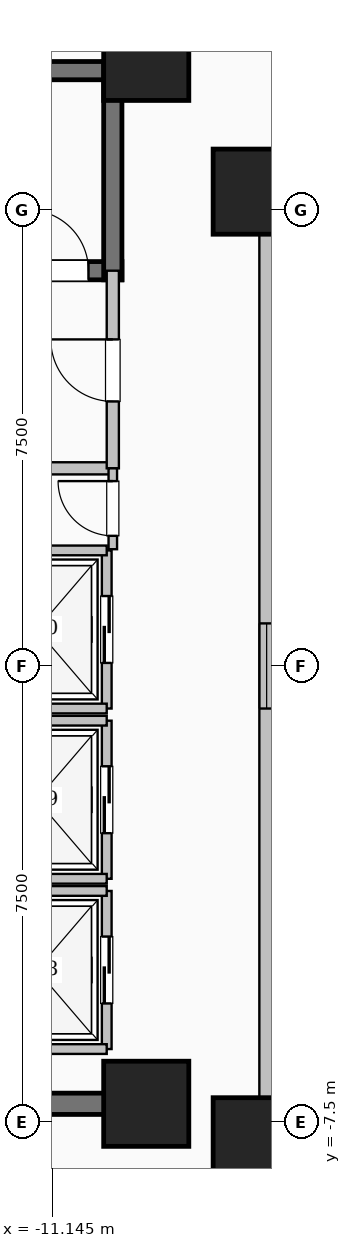
"""IFC4 building model, lengths in metres.
Left out: names, types, materials, properties, quantities, classifications, styles, units other than length and angle.
Written with IfcOpenShell. Run it as: python <this file> out.ifc"""

import sys

from ifc_helpers import new_model, si_unit, direction, frame, frame_2d, origin, origin_2d, place, context, subcontext, project, spatial, rectangle, extrude, element, fill, save


model = new_model("IFC4")
c1 = context("Model", 3, precision=1e-05, world=origin(), true_north=direction((0.0, 1.0)))
c2 = subcontext(c1, "Body", "Model", "MODEL_VIEW")
j1 = project(units=[si_unit("LENGTHUNIT", "METRE"), si_unit("PLANEANGLEUNIT", "RADIAN")], contexts=[c1])
p1 = place(None, origin())
s1 = spatial("IfcSite", under=j1, at=p1, CompositionType="ELEMENT")
p2 = place(p1, origin())
s2 = spatial("IfcBuilding", under=s1, at=p2, CompositionType="ELEMENT")
p3 = place(p2, frame((0.0, 0.0, 18.9)))
s3 = spatial("IfcBuildingStorey", under=s2, at=p3, CompositionType="ELEMENT", Elevation=18.9)
for number, where, z_axis, x_axis in (
    (1, (-7.8, -7.8, 0.0), (0.0, 0.0, 1.0), (1.0, 0.0, 0.0)),
    (2, (-7.8, 7.8, 0.0), (0.0, 0.0, 1.0), (1.0, 0.0, 0.0)),
    (3, (-9.6, -7.2, 0.0), (0.0, 0.0, 1.0), (1.0, 0.0, 0.0)),
    (4, (-9.6, 10.0, 0.0), (0.0, 0.0, 1.0), (1.0, 0.0, 0.0)),
):
    element("IfcColumn", number, at=place(p3, frame(where, z_axis=z_axis, x_axis=x_axis)), inside=s3, PredefinedType="COLUMN", context=c2, shape_type="SweptSolid", body=[
        extrude(rectangle(XDim=1.4, YDim=1.4, at=origin_2d()), origin(), (0.0, 0.0, 1.0), 5.1),
    ])
p4 = place(p3, frame((-7.62, -7.62, 0.0), z_axis=(0.0, 0.0, 1.0), x_axis=(1.0, 0.0, 0.0)))
e5 = element("IfcWall", 5, at=p4, inside=s3, PredefinedType="SOLIDWALL", context=c2, shape_type="SweptSolid", body=[
    extrude(rectangle(XDim=15.24, YDim=0.24, at=frame_2d((7.62, 0.0))), origin(), (0.0, 0.0, 1.0), 4.85),
])
p5 = place(p4, frame((6.92, 0.0, 0.95)))
e6 = element("IfcOpeningElement", 6, at=p5, cuts=e5, PredefinedType="OPENING", context=c2, shape_type="SweptSolid", body=[
    extrude(rectangle(XDim=1.4, YDim=1.5, at=frame_2d((0.7, 0.75))), frame((0.0, 0.13, 0.0), z_axis=(0.0, -1.0, 0.0), x_axis=(1.0, 0.0, 0.0)), (0.0, 0.0, 1.0), 0.26),
])
p6 = place(p3, frame((7.62, 7.62, 0.0), z_axis=(0.0, 0.0, 1.0), x_axis=(-1.0, 0.0, 0.0)))
e7 = element("IfcWall", 7, at=p6, inside=s3, PredefinedType="SOLIDWALL", context=c2, shape_type="SweptSolid", body=[
    extrude(rectangle(XDim=15.24, YDim=0.24, at=frame_2d((7.62, 0.0))), origin(), (0.0, 0.0, 1.0), 4.85),
])
p7 = place(p6, frame((6.92, 0.0, 0.95)))
e8 = element("IfcOpeningElement", 8, at=p7, cuts=e7, PredefinedType="OPENING", context=c2, shape_type="SweptSolid", body=[
    extrude(rectangle(XDim=1.4, YDim=1.5, at=frame_2d((0.7, 0.75))), frame((0.0, 0.13, 0.0), z_axis=(0.0, -1.0, 0.0), x_axis=(1.0, 0.0, 0.0)), (0.0, 0.0, 1.0), 0.26),
])
p8 = place(p3, frame((-7.62, 7.62, 0.0), z_axis=(0.0, 0.0, 1.0), x_axis=(0.0, -1.0, 0.0)))
e9 = element("IfcWall", 9, at=p8, inside=s3, PredefinedType="SOLIDWALL", context=c2, shape_type="SweptSolid", body=[
    extrude(rectangle(XDim=15.24, YDim=0.24, at=frame_2d((7.62, 0.0))), origin(), (0.0, 0.0, 1.0), 4.85),
])
p9 = place(p8, frame((6.92, 0.0, 0.95)))
e10 = element("IfcOpeningElement", 10, at=p9, cuts=e9, PredefinedType="OPENING", context=c2, shape_type="SweptSolid", body=[
    extrude(rectangle(XDim=1.4, YDim=1.5, at=frame_2d((0.7, 0.75))), frame((0.0, 0.13, 0.0), z_axis=(0.0, -1.0, 0.0), x_axis=(1.0, 0.0, 0.0)), (0.0, 0.0, 1.0), 0.26),
])
p10 = place(p3, frame((-18.0, 9.79, 0.0), z_axis=(0.0, 0.0, 1.0), x_axis=(1.0, 0.0, 0.0)))
e11 = element("IfcWall", 11, at=p10, inside=s3, PredefinedType="SHEAR", context=c2, shape_type="SweptSolid", body=[
    extrude(rectangle(XDim=8.0, YDim=0.3, at=frame_2d((4.0, 0.0))), origin(), (0.0, 0.0, 1.0), 5.1),
])
p11 = place(p3, frame((-18.0, 6.5, 0.0), z_axis=(0.0, 0.0, 1.0), x_axis=(1.0, 0.0, 0.0)))
e12 = element("IfcWall", 12, at=p11, inside=s3, PredefinedType="SHEAR", context=c2, shape_type="SweptSolid", body=[
    extrude(rectangle(XDim=8.0, YDim=0.3, at=frame_2d((4.0, 0.0))), origin(), (0.0, 0.0, 1.0), 5.1),
])
p12 = place(p11, frame((6.45, 0.0, 0.0)))
e13 = element("IfcOpeningElement", 13, at=p12, cuts=e12, PredefinedType="OPENING", context=c2, shape_type="SweptSolid", body=[
    extrude(rectangle(XDim=1.0, YDim=2.15, at=frame_2d((0.5, 1.075))), frame((0.0, 0.16, 0.0), z_axis=(0.0, -1.0, 0.0), x_axis=(1.0, 0.0, 0.0)), (0.0, 0.0, 1.0), 0.32),
])
p13 = place(p3, frame((-10.15, 6.35, 0.0), z_axis=(0.0, 0.0, 1.0), x_axis=(0.0, 1.0, 0.0)))
e14 = element("IfcWall", 14, at=p13, inside=s3, PredefinedType="SHEAR", context=c2, shape_type="SweptSolid", body=[
    extrude(rectangle(XDim=3.59, YDim=0.3, at=frame_2d((1.795, 0.0))), origin(), (0.0, 0.0, 1.0), 5.1),
])
p14 = place(p3, frame((-15.55, 3.25, 0.0), z_axis=(0.0, 0.0, 1.0), x_axis=(1.0, 0.0, 0.0)))
e15 = element("IfcWall", 15, at=p14, inside=s3, PredefinedType="SOLIDWALL", context=c2, shape_type="SweptSolid", body=[
    extrude(rectangle(XDim=5.4, YDim=0.2, at=frame_2d((2.7, 0.0))), origin(), (0.0, 0.0, 1.0), 4.85),
])
p15 = place(p3, frame((-10.15, 3.25, 0.0), z_axis=(0.0, 0.0, 1.0), x_axis=(0.0, 1.0, 0.0)))
e16 = element("IfcWall", 16, at=p15, inside=s3, PredefinedType="SOLIDWALL", context=c2, shape_type="SweptSolid", body=[
    extrude(rectangle(XDim=3.25, YDim=0.2, at=frame_2d((1.625, 0.0))), origin(), (0.0, 0.0, 1.0), 4.85),
])
p16 = place(p15, frame((1.1, 0.0, 0.0)))
e17 = element("IfcOpeningElement", 17, at=p16, cuts=e16, PredefinedType="OPENING", context=c2, shape_type="SweptSolid", body=[
    extrude(rectangle(XDim=1.02, YDim=2.15, at=frame_2d((0.51, 1.075))), frame((0.0, 0.11, 0.0), z_axis=(0.0, -1.0, 0.0), x_axis=(1.0, 0.0, 0.0)), (0.0, 0.0, 1.0), 0.22),
])
p17 = place(p3, frame((-10.25, -6.3, 0.0), z_axis=(0.0, 0.0, 1.0), x_axis=(0.0, 1.0, 0.0)))
e18 = element("IfcWall", 18, at=p17, inside=s3, PredefinedType="SOLIDWALL", context=c2, shape_type="SweptSolid", body=[
    extrude(rectangle(XDim=2.6, YDim=0.16, at=frame_2d((1.3, 0.0))), origin(), (0.0, 0.0, 1.0), 4.85),
])
p18 = place(p17, frame((0.75, 0.0, 0.0)))
e19 = element("IfcOpeningElement", 19, at=p18, cuts=e18, PredefinedType="OPENING", context=c2, shape_type="SweptSolid", body=[
    extrude(rectangle(XDim=1.1, YDim=2.15, at=frame_2d((0.55, 1.075))), frame((0.0, 0.09, 0.0), z_axis=(0.0, -1.0, 0.0), x_axis=(1.0, 0.0, 0.0)), (0.0, 0.0, 1.0), 0.18),
])
for number, where, z_axis, x_axis in (
    (20, (-12.55, -6.3, 0.0), (0.0, 0.0, 1.0), (1.0, 0.0, 0.0)),
    (21, (-12.55, -3.7, 0.0), (0.0, 0.0, 1.0), (1.0, 0.0, 0.0)),
):
    element("IfcWall", number, at=place(p3, frame(where, z_axis=z_axis, x_axis=x_axis)), inside=s3, PredefinedType="SOLIDWALL", context=c2, shape_type="SweptSolid", body=[
        extrude(rectangle(XDim=2.3, YDim=0.16, at=frame_2d((1.15, 0.0))), origin(), (0.0, 0.0, 1.0), 4.85),
    ])
p19 = place(p3, frame((-10.25, -3.5, 0.0), z_axis=(0.0, 0.0, 1.0), x_axis=(0.0, 1.0, 0.0)))
e22 = element("IfcWall", 22, at=p19, inside=s3, PredefinedType="SOLIDWALL", context=c2, shape_type="SweptSolid", body=[
    extrude(rectangle(XDim=2.6, YDim=0.16, at=frame_2d((1.3, 0.0))), origin(), (0.0, 0.0, 1.0), 4.85),
])
p20 = place(p19, frame((0.75, 0.0, 0.0)))
e23 = element("IfcOpeningElement", 23, at=p20, cuts=e22, PredefinedType="OPENING", context=c2, shape_type="SweptSolid", body=[
    extrude(rectangle(XDim=1.1, YDim=2.15, at=frame_2d((0.55, 1.075))), frame((0.0, 0.09, 0.0), z_axis=(0.0, -1.0, 0.0), x_axis=(1.0, 0.0, 0.0)), (0.0, 0.0, 1.0), 0.18),
])
for number, where, z_axis, x_axis in (
    (24, (-12.55, -3.5, 0.0), (0.0, 0.0, 1.0), (1.0, 0.0, 0.0)),
    (25, (-12.55, -0.9, 0.0), (0.0, 0.0, 1.0), (1.0, 0.0, 0.0)),
):
    element("IfcWall", number, at=place(p3, frame(where, z_axis=z_axis, x_axis=x_axis)), inside=s3, PredefinedType="SOLIDWALL", context=c2, shape_type="SweptSolid", body=[
        extrude(rectangle(XDim=2.3, YDim=0.16, at=frame_2d((1.15, 0.0))), origin(), (0.0, 0.0, 1.0), 4.85),
    ])
p21 = place(p3, frame((-10.25, -0.7, 0.0), z_axis=(0.0, 0.0, 1.0), x_axis=(0.0, 1.0, 0.0)))
e26 = element("IfcWall", 26, at=p21, inside=s3, PredefinedType="SOLIDWALL", context=c2, shape_type="SweptSolid", body=[
    extrude(rectangle(XDim=2.6, YDim=0.16, at=frame_2d((1.3, 0.0))), origin(), (0.0, 0.0, 1.0), 4.85),
])
p22 = place(p21, frame((0.75, 0.0, 0.0)))
e27 = element("IfcOpeningElement", 27, at=p22, cuts=e26, PredefinedType="OPENING", context=c2, shape_type="SweptSolid", body=[
    extrude(rectangle(XDim=1.1, YDim=2.15, at=frame_2d((0.55, 1.075))), frame((0.0, 0.09, 0.0), z_axis=(0.0, -1.0, 0.0), x_axis=(1.0, 0.0, 0.0)), (0.0, 0.0, 1.0), 0.18),
])
for number, where, z_axis, x_axis in (
    (28, (-12.55, -0.7, 0.0), (0.0, 0.0, 1.0), (1.0, 0.0, 0.0)),
    (29, (-12.55, 1.9, 0.0), (0.0, 0.0, 1.0), (1.0, 0.0, 0.0)),
):
    element("IfcWall", number, at=place(p3, frame(where, z_axis=z_axis, x_axis=x_axis)), inside=s3, PredefinedType="SOLIDWALL", context=c2, shape_type="SweptSolid", body=[
        extrude(rectangle(XDim=2.3, YDim=0.16, at=frame_2d((1.15, 0.0))), origin(), (0.0, 0.0, 1.0), 4.85),
    ])
p23 = place(p3, frame((-18.625, -7.2, 0.0), z_axis=(0.0, 0.0, 1.0), x_axis=(1.0, 0.0, 0.0)))
e30 = element("IfcWall", 30, at=p23, inside=s3, PredefinedType="SHEAR", context=c2, shape_type="SweptSolid", body=[
    extrude(rectangle(XDim=8.55, YDim=0.35, at=frame_2d((4.275, 0.0))), origin(), (0.0, 0.0, 1.0), 5.1),
])
p24 = place(p3, frame((-10.15, 1.92, 0.0), z_axis=(0.0, 0.0, 1.0), x_axis=(0.0, 1.0, 0.0)))
e31 = element("IfcWall", 31, at=p24, inside=s3, PredefinedType="PARTITIONING", context=c2, shape_type="SweptSolid", body=[
    extrude(rectangle(XDim=1.33, YDim=0.14, at=frame_2d((0.665, 0.0))), origin(), (0.0, 0.0, 1.0), 4.85),
])
p25 = place(p24, frame((0.22, 0.0, 0.0)))
e32 = element("IfcOpeningElement", 32, at=p25, cuts=e31, PredefinedType="OPENING", context=c2, shape_type="SweptSolid", body=[
    extrude(rectangle(XDim=0.9, YDim=2.08, at=frame_2d((0.45, 1.04))), frame((0.0, 0.08, 0.0), z_axis=(0.0, -1.0, 0.0), x_axis=(1.0, 0.0, 0.0)), (0.0, 0.0, 1.0), 0.16),
])
p26 = place(p9, origin())
e33 = element("IfcWindow", 33, at=p26, inside=s3, PartitioningType="SINGLE_PANEL", PredefinedType="WINDOW", context=c2, shape_type="SweptSolid", body=[
    extrude(rectangle(XDim=1.4, YDim=1.5, at=frame_2d((0.7, 0.75))), frame((0.0, 0.03, 0.0), z_axis=(0.0, -1.0, 0.0), x_axis=(1.0, 0.0, 0.0)), (0.0, 0.0, 1.0), 0.06),
])
fill(e10, e33)
p27 = place(p12, origin())
e34 = element("IfcDoor", 34, at=p27, inside=s3, OperationType="SINGLE_SWING_LEFT", PredefinedType="DOOR", context=c2, shape_type="SweptSolid", body=[
    extrude(rectangle(XDim=1.0, YDim=2.15, at=frame_2d((0.5, 1.075))), frame((0.0, 0.025, 0.0), z_axis=(0.0, -1.0, 0.0), x_axis=(1.0, 0.0, 0.0)), (0.0, 0.0, 1.0), 0.05),
])
fill(e13, e34)
p28 = place(p16, origin())
e35 = element("IfcDoor", 35, at=p28, inside=s3, OperationType="SINGLE_SWING_RIGHT", PredefinedType="DOOR", context=c2, shape_type="SweptSolid", body=[
    extrude(rectangle(XDim=1.02, YDim=2.15, at=frame_2d((0.51, 1.075))), frame((0.0, 0.025, 0.0), z_axis=(0.0, -1.0, 0.0), x_axis=(1.0, 0.0, 0.0)), (0.0, 0.0, 1.0), 0.05),
])
fill(e17, e35)
p29 = place(p18, origin())
e36 = element("IfcDoor", 36, at=p29, inside=s3, OperationType="SLIDING_TO_LEFT", PredefinedType="DOOR", context=c2, shape_type="SweptSolid", body=[
    extrude(rectangle(XDim=1.1, YDim=2.15, at=frame_2d((0.55, 1.075))), frame((0.0, 0.025, 0.0), z_axis=(0.0, -1.0, 0.0), x_axis=(1.0, 0.0, 0.0)), (0.0, 0.0, 1.0), 0.05),
])
fill(e19, e36)
p30 = place(p20, origin())
e37 = element("IfcDoor", 37, at=p30, inside=s3, OperationType="SLIDING_TO_LEFT", PredefinedType="DOOR", context=c2, shape_type="SweptSolid", body=[
    extrude(rectangle(XDim=1.1, YDim=2.15, at=frame_2d((0.55, 1.075))), frame((0.0, 0.025, 0.0), z_axis=(0.0, -1.0, 0.0), x_axis=(1.0, 0.0, 0.0)), (0.0, 0.0, 1.0), 0.05),
])
fill(e23, e37)
p31 = place(p22, origin())
e38 = element("IfcDoor", 38, at=p31, inside=s3, OperationType="SLIDING_TO_LEFT", PredefinedType="DOOR", context=c2, shape_type="SweptSolid", body=[
    extrude(rectangle(XDim=1.1, YDim=2.15, at=frame_2d((0.55, 1.075))), frame((0.0, 0.025, 0.0), z_axis=(0.0, -1.0, 0.0), x_axis=(1.0, 0.0, 0.0)), (0.0, 0.0, 1.0), 0.05),
])
fill(e27, e38)
p32 = place(p25, origin())
e39 = element("IfcDoor", 39, at=p32, inside=s3, OperationType="SINGLE_SWING_RIGHT", PredefinedType="DOOR", context=c2, shape_type="SweptSolid", body=[
    extrude(rectangle(XDim=0.9, YDim=2.08, at=frame_2d((0.45, 1.04))), frame((0.0, 0.025, 0.0), z_axis=(0.0, -1.0, 0.0), x_axis=(1.0, 0.0, 0.0)), (0.0, 0.0, 1.0), 0.05),
])
fill(e32, e39)
save(model, sys.argv[1])
